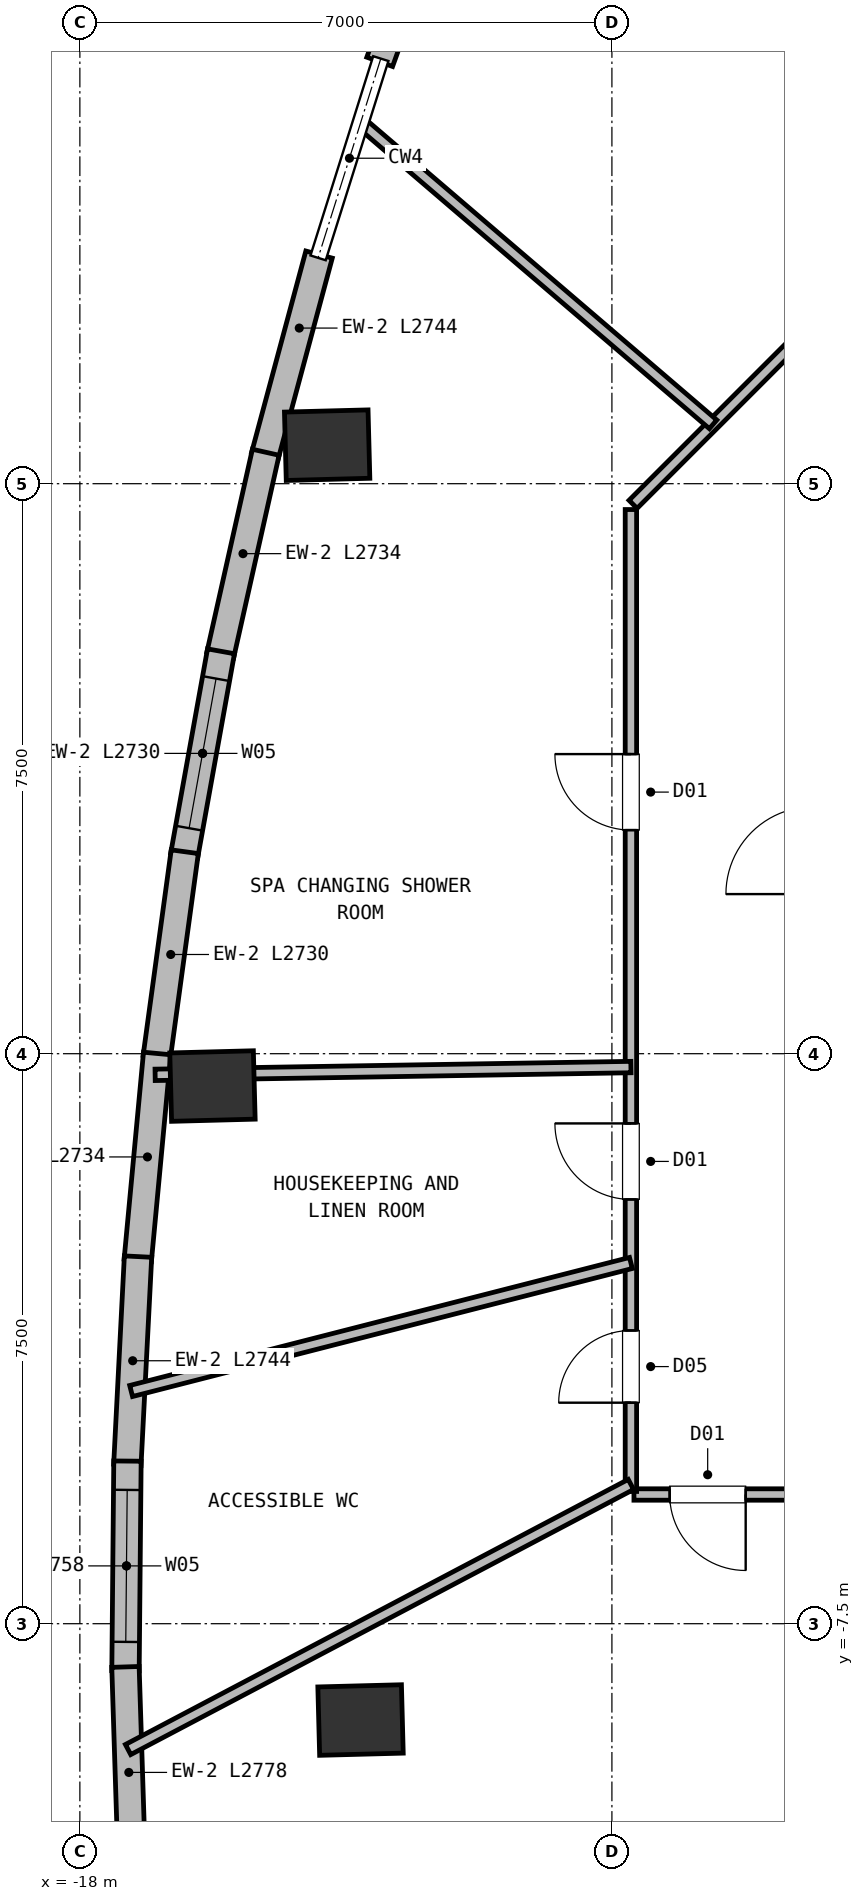
"""IFC4 building model, lengths in metres.
Left out: names, types, materials, properties, quantities, classifications, styles, units other than length and angle.
Written with IfcOpenShell. Run it as: python <this file> out.ifc"""

import sys

from ifc_helpers import new_model, si_unit, direction, frame, frame_2d, origin, origin_2d, place, context, subcontext, project, spatial, rectangle, extrude, element, fill, save


model = new_model("IFC4")
c1 = context("Model", 3, precision=1e-05, world=origin(), true_north=direction((0.0, 1.0)))
c2 = subcontext(c1, "Body", "Model", "MODEL_VIEW")
j1 = project(units=[si_unit("LENGTHUNIT", "METRE"), si_unit("PLANEANGLEUNIT", "RADIAN")], contexts=[c1])
p1 = place(None, origin())
s1 = spatial("IfcSite", under=j1, at=p1, CompositionType="ELEMENT")
p2 = place(p1, origin())
s2 = spatial("IfcBuilding", under=s1, at=p2, CompositionType="ELEMENT")
p3 = place(p2, frame((0.0, 0.0, 92.75)))
s3 = spatial("IfcBuildingStorey", under=s2, at=p3, CompositionType="ELEMENT", Elevation=92.75)
for number, where, z_axis, x_axis in (
    (1, (-14.747, 8.007, 0.0), (0.0, 0.0, 1.0), (-0.026, 1.0, 0.0)),
    (2, (-16.255, -0.426, 0.0), (0.0, 0.0, 1.0), (-0.026, 1.0, 0.0)),
    (3, (-14.307, -8.768, 0.0), (0.0, 0.0, 1.0), (-0.026, 1.0, 0.0)),
):
    element("IfcColumn", number, at=place(p3, frame(where, z_axis=z_axis, x_axis=x_axis)), inside=s3, PredefinedType="COLUMN", context=c2, shape_type="SweptSolid", body=[
        extrude(rectangle(XDim=0.9, YDim=1.1, at=origin_2d()), origin(), (0.0, 0.0, 1.0), 4.5),
    ])
p4 = place(p3, frame((-14.055, 13.051, 0.0), z_axis=(0.0, 0.0, 1.0), x_axis=(0.339208104653, 0.940711359418, 0.0)))
e4 = element("IfcWall", 4, at=p4, inside=s3, PredefinedType="SOLIDWALL", context=c2, shape_type="SweptSolid", body=[
    extrude(rectangle(XDim=2.777, YDim=0.36, at=frame_2d((1.389, 0.0))), origin(), (0.0, 0.0, 1.0), 4.25),
])
p5 = place(p4, frame((0.389, 0.0, 0.72)))
e5 = element("IfcOpeningElement", 5, at=p5, cuts=e4, PredefinedType="OPENING", context=c2, shape_type="SweptSolid", body=[
    extrude(rectangle(XDim=2.0, YDim=2.15, at=frame_2d((1.0, 1.075))), frame((0.0, 0.19, 0.0), z_axis=(0.0, -1.0, 0.0), x_axis=(1.0, 0.0, 0.0)), (0.0, 0.0, 1.0), 0.38),
])
p6 = place(p3, frame((-15.566, 7.865, 0.0), z_axis=(0.0, 0.0, 1.0), x_axis=(0.259976664172, 0.965614899474, 0.0)))
e6 = element("IfcWall", 6, at=p6, inside=s3, PredefinedType="SOLIDWALL", context=c2, shape_type="SweptSolid", body=[
    extrude(rectangle(XDim=2.744, YDim=0.36, at=frame_2d((1.372, 0.0))), origin(), (0.0, 0.0, 1.0), 4.25),
])
p7 = place(p3, frame((-16.153, 5.246, 0.0), z_axis=(0.0, 0.0, 1.0), x_axis=(0.219019260065, 0.975720535666, 0.0)))
e7 = element("IfcWall", 7, at=p7, inside=s3, PredefinedType="SOLIDWALL", context=c2, shape_type="SweptSolid", body=[
    extrude(rectangle(XDim=2.734, YDim=0.36, at=frame_2d((1.367, 0.0))), origin(), (0.0, 0.0, 1.0), 4.25),
])
p8 = place(p3, frame((-16.627, 2.608, 0.0), z_axis=(0.0, 0.0, 1.0), x_axis=(0.177366119488, 0.984144938339, 0.0)))
e8 = element("IfcWall", 8, at=p8, inside=s3, PredefinedType="SOLIDWALL", context=c2, shape_type="SweptSolid", body=[
    extrude(rectangle(XDim=2.729, YDim=0.36, at=frame_2d((1.365, 0.0))), origin(), (0.0, 0.0, 1.0), 4.25),
])
p9 = place(p8, frame((0.365, 0.0, 0.72)))
e9 = element("IfcOpeningElement", 9, at=p9, cuts=e8, PredefinedType="OPENING", context=c2, shape_type="SweptSolid", body=[
    extrude(rectangle(XDim=2.0, YDim=2.15, at=frame_2d((1.0, 1.075))), frame((0.0, 0.19, 0.0), z_axis=(0.0, -1.0, 0.0), x_axis=(1.0, 0.0, 0.0)), (0.0, 0.0, 1.0), 0.38),
])
p10 = place(p3, frame((-16.989, -0.047, 0.0), z_axis=(0.0, 0.0, 1.0), x_axis=(0.135408542402, 0.99078984989, 0.0)))
e10 = element("IfcWall", 10, at=p10, inside=s3, PredefinedType="SOLIDWALL", context=c2, shape_type="SweptSolid", body=[
    extrude(rectangle(XDim=2.73, YDim=0.36, at=frame_2d((1.365, 0.0))), origin(), (0.0, 0.0, 1.0), 4.25),
])
p11 = place(p3, frame((-17.238, -2.72, 0.0), z_axis=(0.0, 0.0, 1.0), x_axis=(0.09321624124, 0.995645887035, 0.0)))
e11 = element("IfcWall", 11, at=p11, inside=s3, PredefinedType="SOLIDWALL", context=c2, shape_type="SweptSolid", body=[
    extrude(rectangle(XDim=2.734, YDim=0.36, at=frame_2d((1.367, 0.0))), origin(), (0.0, 0.0, 1.0), 4.25),
])
p12 = place(p3, frame((-17.375, -5.41, 0.0), z_axis=(0.0, 0.0, 1.0), x_axis=(0.051157869298, 0.998690578913, 0.0)))
e12 = element("IfcWall", 12, at=p12, inside=s3, PredefinedType="SOLIDWALL", context=c2, shape_type="SweptSolid", body=[
    extrude(rectangle(XDim=2.744, YDim=0.36, at=frame_2d((1.372, 0.0))), origin(), (0.0, 0.0, 1.0), 4.25),
])
p13 = place(p3, frame((-17.4, -8.119, 0.0), z_axis=(0.0, 0.0, 1.0), x_axis=(0.009381778629, 0.999955990146, 0.0)))
e13 = element("IfcWall", 13, at=p13, inside=s3, PredefinedType="SOLIDWALL", context=c2, shape_type="SweptSolid", body=[
    extrude(rectangle(XDim=2.758, YDim=0.36, at=frame_2d((1.379, 0.0))), origin(), (0.0, 0.0, 1.0), 4.25),
])
p14 = place(p13, frame((0.379, 0.0, 0.72)))
e14 = element("IfcOpeningElement", 14, at=p14, cuts=e13, PredefinedType="OPENING", context=c2, shape_type="SweptSolid", body=[
    extrude(rectangle(XDim=2.0, YDim=2.15, at=frame_2d((1.0, 1.075))), frame((0.0, 0.19, 0.0), z_axis=(0.0, -1.0, 0.0), x_axis=(1.0, 0.0, 0.0)), (0.0, 0.0, 1.0), 0.38),
])
p15 = place(p3, frame((-17.312, -10.845, 0.0), z_axis=(0.0, 0.0, 1.0), x_axis=(-0.031907059623, 0.999490840151, 0.0)))
e15 = element("IfcWall", 15, at=p15, inside=s3, PredefinedType="SOLIDWALL", context=c2, shape_type="SweptSolid", body=[
    extrude(rectangle(XDim=2.778, YDim=0.36, at=frame_2d((1.389, 0.0))), origin(), (0.0, 0.0, 1.0), 4.25),
])
p16 = place(p3, frame((-8.69, -5.8, 0.0), z_axis=(0.0, 0.0, 1.0), x_axis=(-1.0, 0.0, 0.0)))
e16 = element("IfcWall", 16, at=p16, inside=s3, PredefinedType="PARTITIONING", context=c2, shape_type="SweptSolid", body=[
    extrude(rectangle(XDim=2.02, YDim=0.15, at=frame_2d((1.01, 0.0))), origin(), (0.0, 0.0, 1.0), 4.25),
])
p17 = place(p16, frame((0.55, 0.0, 0.0)))
e17 = element("IfcOpeningElement", 17, at=p17, cuts=e16, PredefinedType="OPENING", context=c2, shape_type="SweptSolid", body=[
    extrude(rectangle(XDim=1.0, YDim=2.15, at=frame_2d((0.5, 1.075))), frame((0.0, 0.085, 0.0), z_axis=(0.0, -1.0, 0.0), x_axis=(1.0, 0.0, 0.0)), (0.0, 0.0, 1.0), 0.17),
])
p18 = place(p3, frame((-10.722, 7.228, 0.0), z_axis=(0.0, 0.0, 1.0), x_axis=(0.707106781187, 0.707106781187, 0.0)))
e18 = element("IfcWall", 18, at=p18, inside=s3, PredefinedType="PARTITIONING", context=c2, shape_type="SweptSolid", body=[
    extrude(rectangle(XDim=2.89, YDim=0.15, at=frame_2d((1.445, 0.0))), origin(), (0.0, 0.0, 1.0), 4.25),
])
p19 = place(p3, frame((-10.75, -5.76, 0.0), z_axis=(0.0, 0.0, 1.0), x_axis=(0.0, 1.0, 0.0)))
e19 = element("IfcWall", 19, at=p19, inside=s3, PredefinedType="PARTITIONING", context=c2, shape_type="SweptSolid", body=[
    extrude(rectangle(XDim=12.92, YDim=0.15, at=frame_2d((6.46, 0.0))), origin(), (0.0, 0.0, 1.0), 4.25),
])
p20 = place(p19, frame((3.843, 0.0, 0.0)))
e20 = element("IfcOpeningElement", 20, at=p20, cuts=e19, PredefinedType="OPENING", context=c2, shape_type="SweptSolid", body=[
    extrude(rectangle(XDim=1.0, YDim=2.15, at=frame_2d((0.5, 1.075))), frame((0.0, 0.085, 0.0), z_axis=(0.0, -1.0, 0.0), x_axis=(1.0, 0.0, 0.0)), (0.0, 0.0, 1.0), 0.17),
])
p21 = place(p19, frame((1.168, 0.0, 0.0)))
e21 = element("IfcOpeningElement", 21, at=p21, cuts=e19, PredefinedType="OPENING", context=c2, shape_type="SweptSolid", body=[
    extrude(rectangle(XDim=0.95, YDim=2.1, at=frame_2d((0.475, 1.05))), frame((0.0, 0.085, 0.0), z_axis=(0.0, -1.0, 0.0), x_axis=(1.0, 0.0, 0.0)), (0.0, 0.0, 1.0), 0.17),
])
p22 = place(p19, frame((8.702, 0.0, 0.0)))
e22 = element("IfcOpeningElement", 22, at=p22, cuts=e19, PredefinedType="OPENING", context=c2, shape_type="SweptSolid", body=[
    extrude(rectangle(XDim=1.0, YDim=2.15, at=frame_2d((0.5, 1.075))), frame((0.0, 0.085, 0.0), z_axis=(0.0, -1.0, 0.0), x_axis=(1.0, 0.0, 0.0)), (0.0, 0.0, 1.0), 0.17),
])
p23 = place(p3, frame((-10.75, -5.668, 0.0), z_axis=(0.0, 0.0, 1.0), x_axis=(-0.884575956978, -0.466396158149, 0.0)))
e23 = element("IfcWall", 23, at=p23, inside=s3, PredefinedType="PARTITIONING", context=c2, shape_type="SweptSolid", body=[
    extrude(rectangle(XDim=7.479, YDim=0.15, at=frame_2d((3.739, 0.0))), origin(), (0.0, 0.0, 1.0), 4.25),
])
p24 = place(p3, frame((-9.669, 8.281, 0.0), z_axis=(0.0, 0.0, 1.0), x_axis=(-0.75949368275, 0.650514677669, 0.0)))
e24 = element("IfcWall", 24, at=p24, inside=s3, PredefinedType="PARTITIONING", context=c2, shape_type="SweptSolid", body=[
    extrude(rectangle(XDim=6.105, YDim=0.15, at=frame_2d((3.052, 0.0))), origin(), (0.0, 0.0, 1.0), 4.25),
])
p25 = place(p3, frame((-10.75, -0.176, 0.0), z_axis=(0.0, 0.0, 1.0), x_axis=(-0.999865864061, -0.016378457992, 0.0)))
e25 = element("IfcWall", 25, at=p25, inside=s3, PredefinedType="PARTITIONING", context=c2, shape_type="SweptSolid", body=[
    extrude(rectangle(XDim=6.26, YDim=0.15, at=frame_2d((3.13, 0.0))), origin(), (0.0, 0.0, 1.0), 3.73),
])
p26 = place(p3, frame((-10.75, -2.754, 0.0), z_axis=(0.0, 0.0, 1.0), x_axis=(-0.96872352571, -0.248142561314, 0.0)))
e26 = element("IfcWall", 26, at=p26, inside=s3, PredefinedType="PARTITIONING", context=c2, shape_type="SweptSolid", body=[
    extrude(rectangle(XDim=6.788, YDim=0.15, at=frame_2d((3.394, 0.0))), origin(), (0.0, 0.0, 1.0), 4.25),
])
p27 = place(p9, origin())
e27 = element("IfcWindow", 27, at=p27, inside=s3, PartitioningType="SINGLE_PANEL", PredefinedType="WINDOW", context=c2, shape_type="SweptSolid", body=[
    extrude(rectangle(XDim=2.0, YDim=2.15, at=frame_2d((1.0, 1.075))), frame((0.0, 0.03, 0.0), z_axis=(0.0, -1.0, 0.0), x_axis=(1.0, 0.0, 0.0)), (0.0, 0.0, 1.0), 0.06),
])
fill(e9, e27)
p28 = place(p14, origin())
e28 = element("IfcWindow", 28, at=p28, inside=s3, PartitioningType="SINGLE_PANEL", PredefinedType="WINDOW", context=c2, shape_type="SweptSolid", body=[
    extrude(rectangle(XDim=2.0, YDim=2.15, at=frame_2d((1.0, 1.075))), frame((0.0, 0.03, 0.0), z_axis=(0.0, -1.0, 0.0), x_axis=(1.0, 0.0, 0.0)), (0.0, 0.0, 1.0), 0.06),
])
fill(e14, e28)
p29 = place(p20, origin())
e29 = element("IfcDoor", 29, at=p29, inside=s3, OperationType="SINGLE_SWING_RIGHT", PredefinedType="DOOR", context=c2, shape_type="SweptSolid", body=[
    extrude(rectangle(XDim=1.0, YDim=2.15, at=frame_2d((0.5, 1.075))), frame((0.0, 0.025, 0.0), z_axis=(0.0, -1.0, 0.0), x_axis=(1.0, 0.0, 0.0)), (0.0, 0.0, 1.0), 0.05),
])
fill(e20, e29)
p30 = place(p21, origin())
e30 = element("IfcDoor", 30, at=p30, inside=s3, OperationType="SINGLE_SWING_LEFT", PredefinedType="DOOR", context=c2, shape_type="SweptSolid", body=[
    extrude(rectangle(XDim=0.95, YDim=2.1, at=frame_2d((0.475, 1.05))), frame((0.0, 0.025, 0.0), z_axis=(0.0, -1.0, 0.0), x_axis=(1.0, 0.0, 0.0)), (0.0, 0.0, 1.0), 0.05),
])
fill(e21, e30)
p31 = place(p22, origin())
e31 = element("IfcDoor", 31, at=p31, inside=s3, OperationType="SINGLE_SWING_RIGHT", PredefinedType="DOOR", context=c2, shape_type="SweptSolid", body=[
    extrude(rectangle(XDim=1.0, YDim=2.15, at=frame_2d((0.5, 1.075))), frame((0.0, 0.025, 0.0), z_axis=(0.0, -1.0, 0.0), x_axis=(1.0, 0.0, 0.0)), (0.0, 0.0, 1.0), 0.05),
])
fill(e22, e31)
p32 = place(p17, origin())
e32 = element("IfcDoor", 32, at=p32, inside=s3, OperationType="SINGLE_SWING_LEFT", PredefinedType="DOOR", context=c2, shape_type="SweptSolid", body=[
    extrude(rectangle(XDim=1.0, YDim=2.15, at=frame_2d((0.5, 1.075))), frame((0.0, 0.025, 0.0), z_axis=(0.0, -1.0, 0.0), x_axis=(1.0, 0.0, 0.0)), (0.0, 0.0, 1.0), 0.05),
])
fill(e17, e32)
save(model, sys.argv[1])
